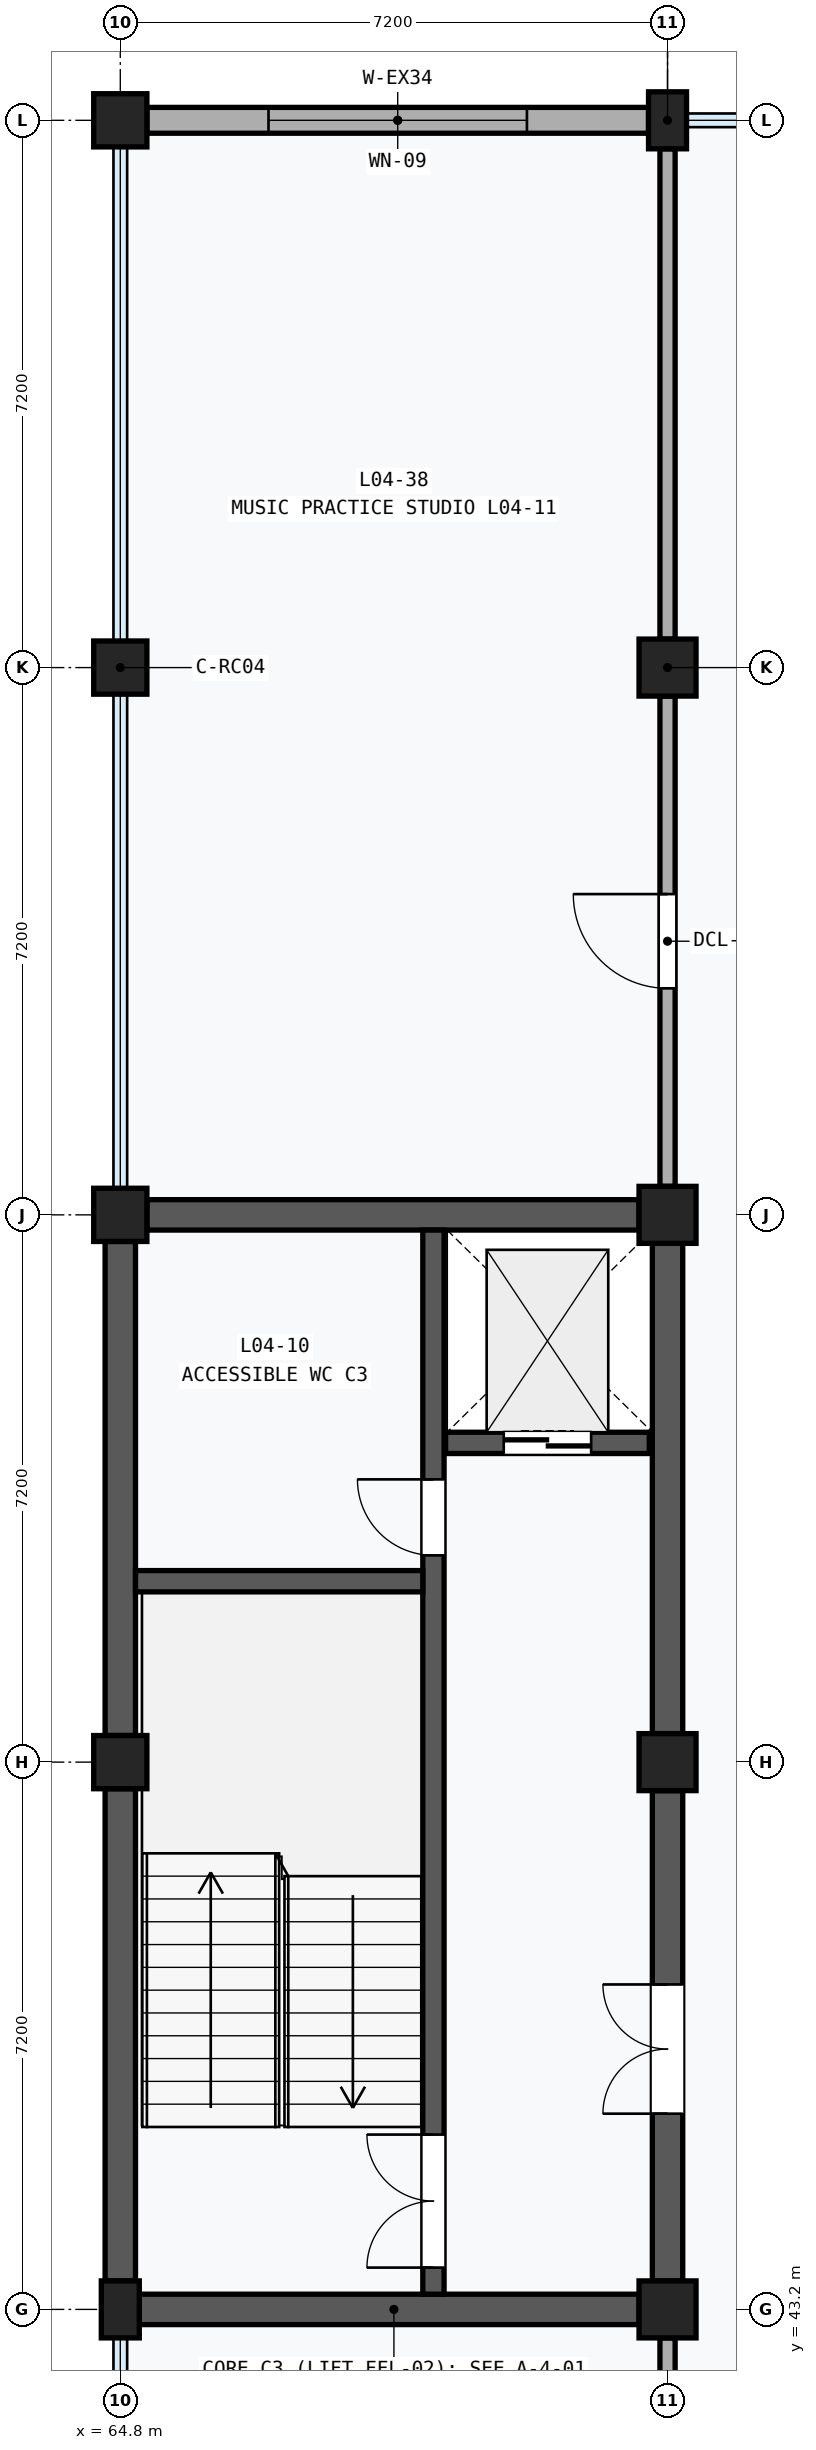
"""IFC4 building model, lengths in metres.
Left out: names, types, materials, properties, quantities, classifications, styles, units other than length and angle.
Written with IfcOpenShell. Run it as: python <this file> out.ifc"""

import sys

from ifc_helpers import new_model, si_unit, direction, frame, frame_2d, origin, origin_2d, place, context, subcontext, project, spatial, rectangle, extrude, element, fill, save


model = new_model("IFC4")
c1 = context("Model", 3, precision=1e-05, world=origin(), true_north=direction((0.0, 1.0)))
c2 = subcontext(c1, "Body", "Model", "MODEL_VIEW")
j1 = project(units=[si_unit("LENGTHUNIT", "METRE"), si_unit("PLANEANGLEUNIT", "RADIAN")], contexts=[c1])
p1 = place(None, origin())
s1 = spatial("IfcSite", under=j1, at=p1, CompositionType="ELEMENT")
p2 = place(p1, origin())
s2 = spatial("IfcBuilding", under=s1, at=p2, CompositionType="ELEMENT")
p3 = place(p2, frame((0.0, 0.0, 18.6)))
s3 = spatial("IfcBuildingStorey", under=s2, at=p3, CompositionType="ELEMENT", Elevation=18.6)
p4 = place(p3, frame((64.8, 43.2, 0.0), z_axis=(0.0, 0.0, 1.0), x_axis=(1.0, 0.0, 0.0)))
e1 = element("IfcColumn", 1, at=p4, inside=s3, PredefinedType="PILASTER", context=c2, shape_type="SweptSolid", body=[
    extrude(rectangle(XDim=0.5, YDim=0.75, at=origin_2d()), origin(), (0.0, 0.0, 1.0), 4.0),
])
for number, where, z_axis, x_axis in (
    (2, (64.8, 50.4, 0.0), (0.0, 0.0, 1.0), (1.0, 0.0, 0.0)),
    (3, (64.8, 57.6, 0.0), (0.0, 0.0, 1.0), (1.0, 0.0, 0.0)),
    (4, (64.8, 64.8, 0.0), (0.0, 0.0, 1.0), (1.0, 0.0, 0.0)),
    (5, (64.8, 72.0, 0.0), (0.0, 0.0, 1.0), (1.0, 0.0, 0.0)),
):
    element("IfcColumn", number, at=place(p3, frame(where, z_axis=z_axis, x_axis=x_axis)), inside=s3, PredefinedType="COLUMN", context=c2, shape_type="SweptSolid", body=[
        extrude(rectangle(XDim=0.7, YDim=0.7, at=origin_2d()), origin(), (0.0, 0.0, 1.0), 4.0),
    ])
for number, where, z_axis, x_axis in (
    (6, (72.0, 43.2, 0.0), (0.0, 0.0, 1.0), (1.0, 0.0, 0.0)),
    (7, (72.0, 50.4, 0.0), (0.0, 0.0, 1.0), (1.0, 0.0, 0.0)),
    (8, (72.0, 57.6, 0.0), (0.0, 0.0, 1.0), (1.0, 0.0, 0.0)),
    (9, (72.0, 64.8, 0.0), (0.0, 0.0, 1.0), (1.0, 0.0, 0.0)),
):
    element("IfcColumn", number, at=place(p3, frame(where, z_axis=z_axis, x_axis=x_axis)), inside=s3, PredefinedType="COLUMN", context=c2, shape_type="SweptSolid", body=[
        extrude(rectangle(XDim=0.75, YDim=0.75, at=origin_2d()), origin(), (0.0, 0.0, 1.0), 4.0),
    ])
p5 = place(p3, frame((72.0, 72.0, 0.0), z_axis=(0.0, 0.0, 1.0), x_axis=(1.0, 0.0, 0.0)))
e10 = element("IfcColumn", 10, at=p5, inside=s3, PredefinedType="PILASTER", context=c2, shape_type="SweptSolid", body=[
    extrude(rectangle(XDim=0.5, YDim=0.75, at=origin_2d()), origin(), (0.0, 0.0, 1.0), 4.0),
])
p6 = place(p3, frame((65.15, 72.0, 0.0), z_axis=(0.0, 0.0, 1.0), x_axis=(1.0, 0.0, 0.0)))
e11 = element("IfcWall", 11, at=p6, inside=s3, PredefinedType="SOLIDWALL", context=c2, shape_type="SweptSolid", body=[
    extrude(rectangle(XDim=6.6, YDim=0.34, at=frame_2d((3.3, 0.0))), origin(), (0.0, 0.0, 1.0), 3.11),
])
p7 = place(p6, frame((1.6, 0.0, 0.9)))
e12 = element("IfcOpeningElement", 12, at=p7, cuts=e11, PredefinedType="OPENING", context=c2, shape_type="SweptSolid", body=[
    extrude(rectangle(XDim=3.4, YDim=1.8, at=frame_2d((1.7, 0.9))), frame((0.0, 0.182, 0.0), z_axis=(0.0, -1.0, 0.0), x_axis=(1.0, 0.0, 0.0)), (0.0, 0.0, 1.0), 0.364),
])
p8 = place(p3, frame((64.8, 43.575, 0.0), z_axis=(0.0, 0.0, 1.0), x_axis=(0.0, 1.0, 0.0)))
e13 = element("IfcWall", 13, at=p8, inside=s3, PredefinedType="SHEAR", context=c2, shape_type="SweptSolid", body=[
    extrude(rectangle(XDim=6.475, YDim=0.4, at=frame_2d((3.238, 0.0))), origin(), (0.0, 0.0, 1.0), 3.11),
])
p9 = place(p3, frame((64.8, 50.75, 0.0), z_axis=(0.0, 0.0, 1.0), x_axis=(0.0, 1.0, 0.0)))
e14 = element("IfcWall", 14, at=p9, inside=s3, PredefinedType="SHEAR", context=c2, shape_type="SweptSolid", body=[
    extrude(rectangle(XDim=6.5, YDim=0.4, at=frame_2d((3.25, 0.0))), origin(), (0.0, 0.0, 1.0), 3.11),
])
p10 = place(p3, frame((72.0, 43.575, 0.0), z_axis=(0.0, 0.0, 1.0), x_axis=(0.0, 1.0, 0.0)))
e15 = element("IfcWall", 15, at=p10, inside=s3, PredefinedType="SHEAR", context=c2, shape_type="SweptSolid", body=[
    extrude(rectangle(XDim=6.45, YDim=0.4, at=frame_2d((3.225, 0.0))), origin(), (0.0, 0.0, 1.0), 2.97),
])
p11 = place(p10, frame((2.2, 0.0, 0.0)))
e16 = element("IfcOpeningElement", 16, at=p11, cuts=e15, PredefinedType="OPENING", context=c2, shape_type="SweptSolid", body=[
    extrude(rectangle(XDim=1.7, YDim=2.25, at=frame_2d((0.85, 1.125))), frame((0.0, 0.212, 0.0), z_axis=(0.0, -1.0, 0.0), x_axis=(1.0, 0.0, 0.0)), (0.0, 0.0, 1.0), 0.424),
])
p12 = place(p3, frame((72.0, 50.775, 0.0), z_axis=(0.0, 0.0, 1.0), x_axis=(0.0, 1.0, 0.0)))
e17 = element("IfcWall", 17, at=p12, inside=s3, PredefinedType="SHEAR", context=c2, shape_type="SweptSolid", body=[
    extrude(rectangle(XDim=6.45, YDim=0.4, at=frame_2d((3.225, 0.0))), origin(), (0.0, 0.0, 1.0), 2.97),
])
p13 = place(p3, frame((65.05, 43.2, 0.0), z_axis=(0.0, 0.0, 1.0), x_axis=(1.0, 0.0, 0.0)))
e18 = element("IfcWall", 18, at=p13, inside=s3, PredefinedType="SHEAR", context=c2, shape_type="SweptSolid", body=[
    extrude(rectangle(XDim=6.575, YDim=0.4, at=frame_2d((3.288, 0.0))), origin(), (0.0, 0.0, 1.0), 2.97),
])
p14 = place(p3, frame((65.15, 57.6, 0.0), z_axis=(0.0, 0.0, 1.0), x_axis=(1.0, 0.0, 0.0)))
e19 = element("IfcWall", 19, at=p14, inside=s3, PredefinedType="SHEAR", context=c2, shape_type="SweptSolid", body=[
    extrude(rectangle(XDim=6.475, YDim=0.4, at=frame_2d((3.238, 0.0))), origin(), (0.0, 0.0, 1.0), 2.97),
])
p15 = place(p3, frame((68.92, 43.4, 0.0), z_axis=(0.0, 0.0, 1.0), x_axis=(0.0, 1.0, 0.0)))
e20 = element("IfcWall", 20, at=p15, inside=s3, PredefinedType="SHEAR", context=c2, shape_type="SweptSolid", body=[
    extrude(rectangle(XDim=14.0, YDim=0.28, at=frame_2d((7.0, 0.0))), origin(), (0.0, 0.0, 1.0), 3.74),
])
p16 = place(p15, frame((0.35, 0.0, 0.0)))
e21 = element("IfcOpeningElement", 21, at=p16, cuts=e20, PredefinedType="OPENING", context=c2, shape_type="SweptSolid", body=[
    extrude(rectangle(XDim=1.75, YDim=2.15, at=frame_2d((0.875, 1.075))), frame((0.0, 0.152, 0.0), z_axis=(0.0, -1.0, 0.0), x_axis=(1.0, 0.0, 0.0)), (0.0, 0.0, 1.0), 0.304),
])
p17 = place(p15, frame((9.72, 0.0, 0.0)))
e22 = element("IfcOpeningElement", 22, at=p17, cuts=e20, PredefinedType="OPENING", context=c2, shape_type="SweptSolid", body=[
    extrude(rectangle(XDim=1.0, YDim=2.15, at=frame_2d((0.5, 1.075))), frame((0.0, 0.152, 0.0), z_axis=(0.0, -1.0, 0.0), x_axis=(1.0, 0.0, 0.0)), (0.0, 0.0, 1.0), 0.304),
])
p18 = place(p3, frame((65.0, 52.78, 0.0), z_axis=(0.0, 0.0, 1.0), x_axis=(1.0, 0.0, 0.0)))
e23 = element("IfcWall", 23, at=p18, inside=s3, PredefinedType="SHEAR", context=c2, shape_type="SweptSolid", body=[
    extrude(rectangle(XDim=3.78, YDim=0.28, at=frame_2d((1.89, 0.0))), origin(), (0.0, 0.0, 1.0), 3.74),
])
p19 = place(p3, frame((69.08, 54.6, 0.0), z_axis=(0.0, 0.0, 1.0), x_axis=(1.0, 0.0, 0.0)))
e24 = element("IfcWall", 24, at=p19, inside=s3, PredefinedType="SHEAR", context=c2, shape_type="SweptSolid", body=[
    extrude(rectangle(XDim=2.68, YDim=0.28, at=frame_2d((1.34, 0.0))), origin(), (0.0, 0.0, 1.0), 3.74),
])
p20 = place(p19, frame((0.765, 0.0, 0.0)))
e25 = element("IfcOpeningElement", 25, at=p20, cuts=e24, PredefinedType="OPENING", context=c2, shape_type="SweptSolid", body=[
    extrude(rectangle(XDim=1.15, YDim=2.2, at=frame_2d((0.575, 1.1))), frame((0.0, 0.152, 0.0), z_axis=(0.0, -1.0, 0.0), x_axis=(1.0, 0.0, 0.0)), (0.0, 0.0, 1.0), 0.304),
])
p21 = place(p3, frame((72.0, 36.375, 0.0), z_axis=(0.0, 0.0, 1.0), x_axis=(0.0, 1.0, 0.0)))
e26 = element("IfcWall", 26, at=p21, inside=s3, PredefinedType="PARTITIONING", context=c2, shape_type="SweptSolid", body=[
    extrude(rectangle(XDim=6.45, YDim=0.2, at=frame_2d((3.225, 0.0))), origin(), (0.0, 0.0, 1.0), 2.97),
])
p22 = place(p3, frame((72.0, 57.975, 0.0), z_axis=(0.0, 0.0, 1.0), x_axis=(0.0, 1.0, 0.0)))
e27 = element("IfcWall", 27, at=p22, inside=s3, PredefinedType="PARTITIONING", context=c2, shape_type="SweptSolid", body=[
    extrude(rectangle(XDim=6.45, YDim=0.2, at=frame_2d((3.225, 0.0))), origin(), (0.0, 0.0, 1.0), 2.97),
])
p23 = place(p22, frame((2.605, 0.0, 0.0)))
e28 = element("IfcOpeningElement", 28, at=p23, cuts=e27, PredefinedType="OPENING", context=c2, shape_type="SweptSolid", body=[
    extrude(rectangle(XDim=1.24, YDim=2.26, at=frame_2d((0.62, 1.13))), frame((0.0, 0.112, 0.0), z_axis=(0.0, -1.0, 0.0), x_axis=(1.0, 0.0, 0.0)), (0.0, 0.0, 1.0), 0.224),
])
p24 = place(p3, frame((72.0, 65.175, 0.0), z_axis=(0.0, 0.0, 1.0), x_axis=(0.0, 1.0, 0.0)))
e29 = element("IfcWall", 29, at=p24, inside=s3, PredefinedType="PARTITIONING", context=c2, shape_type="SweptSolid", body=[
    extrude(rectangle(XDim=6.45, YDim=0.2, at=frame_2d((3.225, 0.0))), origin(), (0.0, 0.0, 1.0), 2.97),
])
p25 = place(p7, origin())
e30 = element("IfcWindow", 30, at=p25, inside=s3, PartitioningType="SINGLE_PANEL", PredefinedType="WINDOW", context=c2, shape_type="SweptSolid", body=[
    extrude(rectangle(XDim=3.4, YDim=1.8, at=frame_2d((1.7, 0.9))), frame((0.0, 0.03, 0.0), z_axis=(0.0, -1.0, 0.0), x_axis=(1.0, 0.0, 0.0)), (0.0, 0.0, 1.0), 0.06),
])
fill(e12, e30)
p26 = place(p11, origin())
e31 = element("IfcDoor", 31, at=p26, inside=s3, OperationType="DOUBLE_DOOR_SINGLE_SWING", PredefinedType="DOOR", context=c2, shape_type="SweptSolid", body=[
    extrude(rectangle(XDim=1.7, YDim=2.25, at=frame_2d((0.85, 1.125))), frame((0.0, 0.025, 0.0), z_axis=(0.0, -1.0, 0.0), x_axis=(1.0, 0.0, 0.0)), (0.0, 0.0, 1.0), 0.05),
])
fill(e16, e31)
p27 = place(p16, origin())
e32 = element("IfcDoor", 32, at=p27, inside=s3, OperationType="DOUBLE_DOOR_SINGLE_SWING", PredefinedType="DOOR", context=c2, shape_type="SweptSolid", body=[
    extrude(rectangle(XDim=1.75, YDim=2.15, at=frame_2d((0.875, 1.075))), frame((0.0, 0.025, 0.0), z_axis=(0.0, -1.0, 0.0), x_axis=(1.0, 0.0, 0.0)), (0.0, 0.0, 1.0), 0.05),
])
fill(e21, e32)
p28 = place(p17, origin())
e33 = element("IfcDoor", 33, at=p28, inside=s3, OperationType="SINGLE_SWING_RIGHT", PredefinedType="DOOR", context=c2, shape_type="SweptSolid", body=[
    extrude(rectangle(XDim=1.0, YDim=2.15, at=frame_2d((0.5, 1.075))), frame((0.0, 0.025, 0.0), z_axis=(0.0, -1.0, 0.0), x_axis=(1.0, 0.0, 0.0)), (0.0, 0.0, 1.0), 0.05),
])
fill(e22, e33)
p29 = place(p20, frame((1.15, 0.0, 0.0), z_axis=(0.0, 0.0, 1.0), x_axis=(-1.0, 0.0, 0.0)))
e34 = element("IfcDoor", 34, at=p29, inside=s3, OperationType="DOUBLE_DOOR_SLIDING", PredefinedType="DOOR", context=c2, shape_type="SweptSolid", body=[
    extrude(rectangle(XDim=1.15, YDim=2.2, at=frame_2d((0.575, 1.1))), frame((0.0, 0.025, 0.0), z_axis=(0.0, -1.0, 0.0), x_axis=(1.0, 0.0, 0.0)), (0.0, 0.0, 1.0), 0.05),
])
fill(e25, e34)
p30 = place(p23, origin())
e35 = element("IfcDoor", 35, at=p30, inside=s3, OperationType="SINGLE_SWING_RIGHT", PredefinedType="DOOR", context=c2, shape_type="SweptSolid", body=[
    extrude(rectangle(XDim=1.24, YDim=2.26, at=frame_2d((0.62, 1.13))), frame((0.0, 0.025, 0.0), z_axis=(0.0, -1.0, 0.0), x_axis=(1.0, 0.0, 0.0)), (0.0, 0.0, 1.0), 0.05),
])
fill(e28, e35)
save(model, sys.argv[1])
